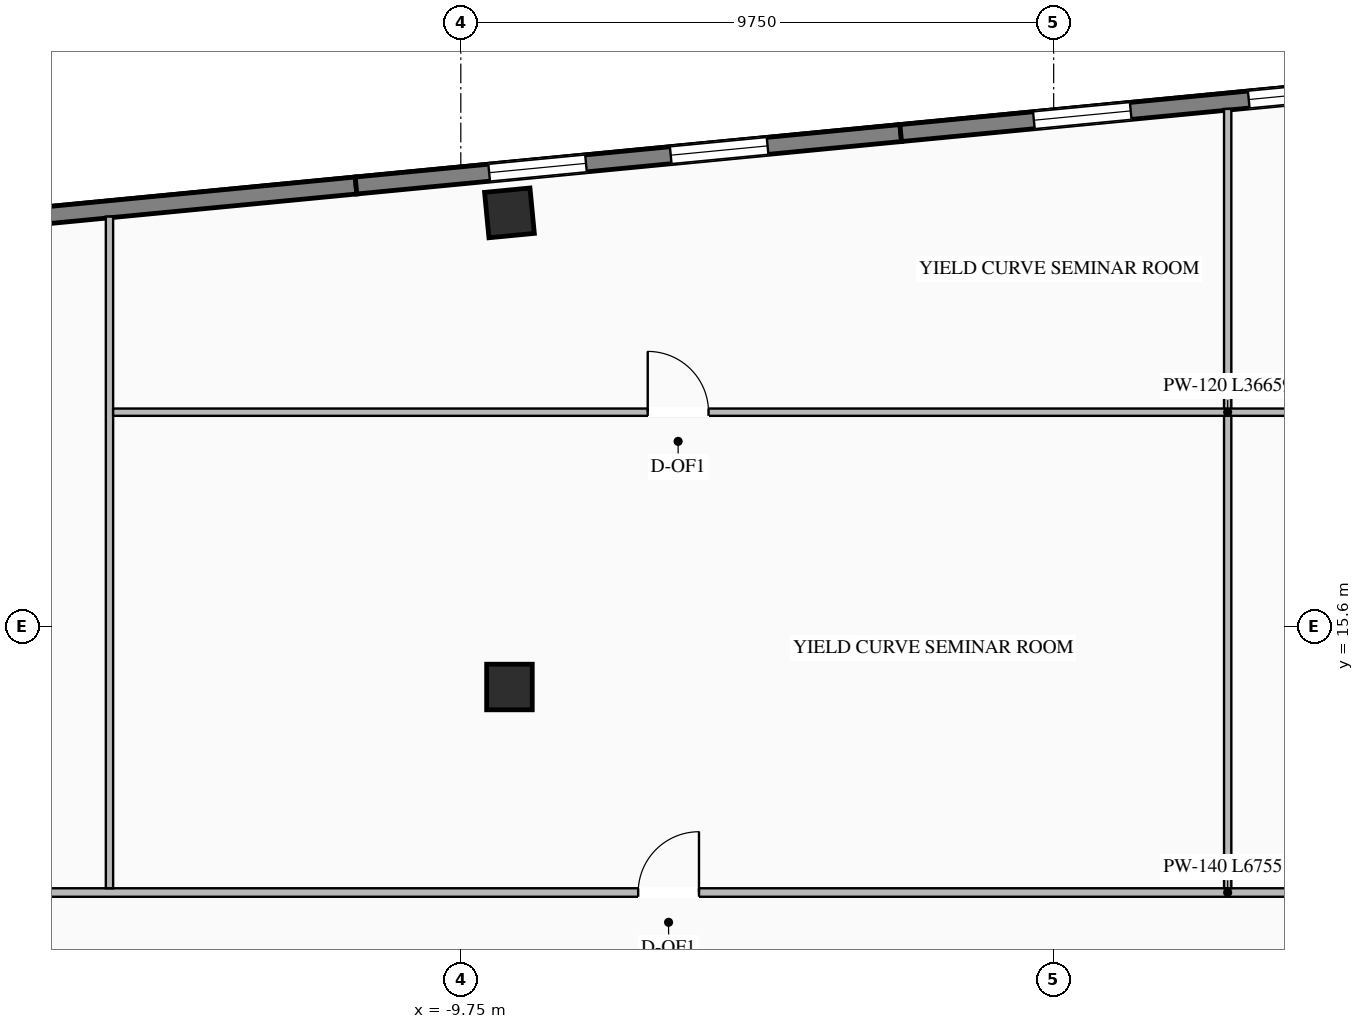
"""IFC4 building model, lengths in metres.
Left out: names, types, materials, properties, quantities, classifications, styles, units other than length and angle.
Written with IfcOpenShell. Run it as: python <this file> out.ifc"""

import sys

from ifc_helpers import new_model, si_unit, direction, frame, frame_2d, origin, origin_2d, place, context, subcontext, project, spatial, rectangle, i_section, extrude, element, fill, save


model = new_model("IFC4")
c1 = context("Model", 3, precision=1e-05, world=origin(), true_north=direction((0.0, 1.0)))
c2 = subcontext(c1, "Body", "Model", "MODEL_VIEW")
j1 = project(units=[si_unit("LENGTHUNIT", "METRE"), si_unit("PLANEANGLEUNIT", "RADIAN")], contexts=[c1])
p1 = place(None, origin())
s1 = spatial("IfcSite", under=j1, at=p1, CompositionType="ELEMENT")
p2 = place(p1, origin())
s2 = spatial("IfcBuilding", under=s1, at=p2, CompositionType="ELEMENT")
p3 = place(p2, frame((0.0, 0.0, 94.9)))
s3 = spatial("IfcBuildingStorey", under=s2, at=p3, CompositionType="ELEMENT", Elevation=94.9)
for number, where, z_axis, x_axis in (
    (1, (-8.95, 14.6, 0.0), (0.0, 0.0, 1.0), (1.0, 0.0, 0.0)),
    (2, (-8.95, 22.398, 0.0), (0.0, 0.0, 1.0), (0.995, 0.096, 0.0)),
):
    element("IfcColumn", number, at=place(p3, frame(where, z_axis=z_axis, x_axis=x_axis)), inside=s3, PredefinedType="COLUMN", context=c2, shape_type="SweptSolid", body=[
        extrude(i_section(OverallWidth=0.75, OverallDepth=0.75, WebThickness=0.03, FlangeThickness=0.044, at=origin_2d()), origin(), (0.0, 0.0, 1.0), 3.45),
    ])
p4 = place(p3, frame((-29.231, 21.138, 0.0), z_axis=(0.0, 0.0, 1.0), x_axis=(0.995395780835, 0.095850088663, 0.0)))
e3 = element("IfcWall", 3, at=p4, inside=s3, PredefinedType="STANDARD", context=c2, shape_type="SweptSolid", body=[
    extrude(rectangle(XDim=17.84, YDim=0.28, at=frame_2d((8.92, 0.0))), origin(), (0.0, 0.0, 1.0), 3.25),
])
p5 = place(p4, frame((5.147, 0.0, 0.76)))
e4 = element("IfcOpeningElement", 4, at=p5, cuts=e3, PredefinedType="OPENING", context=c2, shape_type="SweptSolid", body=[
    extrude(rectangle(XDim=1.6, YDim=1.95, at=frame_2d((0.8, 0.975))), frame((0.0, 0.15, 0.0), z_axis=(0.0, -1.0, 0.0), x_axis=(1.0, 0.0, 0.0)), (0.0, 0.0, 1.0), 0.3),
])
p6 = place(p4, frame((11.093, 0.0, 0.76)))
e5 = element("IfcOpeningElement", 5, at=p6, cuts=e3, PredefinedType="OPENING", context=c2, shape_type="SweptSolid", body=[
    extrude(rectangle(XDim=1.6, YDim=1.95, at=frame_2d((0.8, 0.975))), frame((0.0, 0.15, 0.0), z_axis=(0.0, -1.0, 0.0), x_axis=(1.0, 0.0, 0.0)), (0.0, 0.0, 1.0), 0.3),
])
p7 = place(p3, frame((-11.474, 22.848, 0.0), z_axis=(0.0, 0.0, 1.0), x_axis=(0.995396794462, 0.09583956164, 0.0)))
e6 = element("IfcWall", 6, at=p7, inside=s3, PredefinedType="STANDARD", context=c2, shape_type="SweptSolid", body=[
    extrude(rectangle(XDim=9.0, YDim=0.28, at=frame_2d((4.5, 0.0))), origin(), (0.0, 0.0, 1.0), 3.25),
])
p8 = place(p7, frame((2.2, 0.0, 0.76)))
e7 = element("IfcOpeningElement", 7, at=p8, cuts=e6, PredefinedType="OPENING", context=c2, shape_type="SweptSolid", body=[
    extrude(rectangle(XDim=1.6, YDim=1.95, at=frame_2d((0.8, 0.975))), frame((0.0, 0.15, 0.0), z_axis=(0.0, -1.0, 0.0), x_axis=(1.0, 0.0, 0.0)), (0.0, 0.0, 1.0), 0.3),
])
p9 = place(p7, frame((5.2, 0.0, 0.76)))
e8 = element("IfcOpeningElement", 8, at=p9, cuts=e6, PredefinedType="OPENING", context=c2, shape_type="SweptSolid", body=[
    extrude(rectangle(XDim=1.6, YDim=1.95, at=frame_2d((0.8, 0.975))), frame((0.0, 0.15, 0.0), z_axis=(0.0, -1.0, 0.0), x_axis=(1.0, 0.0, 0.0)), (0.0, 0.0, 1.0), 0.3),
])
p10 = place(p3, frame((-2.515, 23.711, 0.0), z_axis=(0.0, 0.0, 1.0), x_axis=(0.995397043619, 0.095836973841, 0.0)))
e9 = element("IfcWall", 9, at=p10, inside=s3, PredefinedType="STANDARD", context=c2, shape_type="SweptSolid", body=[
    extrude(rectangle(XDim=9.0, YDim=0.28, at=frame_2d((4.5, 0.0))), origin(), (0.0, 0.0, 1.0), 3.25),
])
p11 = place(p10, frame((2.2, 0.0, 0.76)))
e10 = element("IfcOpeningElement", 10, at=p11, cuts=e9, PredefinedType="OPENING", context=c2, shape_type="SweptSolid", body=[
    extrude(rectangle(XDim=1.6, YDim=1.95, at=frame_2d((0.8, 0.975))), frame((0.0, 0.15, 0.0), z_axis=(0.0, -1.0, 0.0), x_axis=(1.0, 0.0, 0.0)), (0.0, 0.0, 1.0), 0.3),
])
p12 = place(p10, frame((5.75, 0.0, 0.76)))
e11 = element("IfcOpeningElement", 11, at=p12, cuts=e9, PredefinedType="OPENING", context=c2, shape_type="SweptSolid", body=[
    extrude(rectangle(XDim=1.6, YDim=1.95, at=frame_2d((0.8, 0.975))), frame((0.0, 0.15, 0.0), z_axis=(0.0, -1.0, 0.0), x_axis=(1.0, 0.0, 0.0)), (0.0, 0.0, 1.0), 0.3),
])
p13 = place(p3, frame((-30.567, 11.22, 0.0), z_axis=(0.0, 0.0, 1.0), x_axis=(1.0, 0.0, 0.0)))
e12 = element("IfcWall", 12, at=p13, inside=s3, PredefinedType="STANDARD", context=c2, shape_type="SweptSolid", body=[
    extrude(rectangle(XDim=67.551, YDim=0.14, at=frame_2d((33.775, 0.0))), origin(), (0.0, 0.0, 1.0), 3.25),
])
p14 = place(p13, frame((7.146, 0.0, 0.0)))
e13 = element("IfcOpeningElement", 13, at=p14, cuts=e12, PredefinedType="OPENING", context=c2, shape_type="SweptSolid", body=[
    extrude(rectangle(XDim=1.0, YDim=2.08, at=frame_2d((0.5, 1.04))), frame((0.0, 0.08, 0.0), z_axis=(0.0, -1.0, 0.0), x_axis=(1.0, 0.0, 0.0)), (0.0, 0.0, 1.0), 0.16),
])
p15 = place(p13, frame((23.734, 0.0, 0.0)))
e14 = element("IfcOpeningElement", 14, at=p15, cuts=e12, PredefinedType="OPENING", context=c2, shape_type="SweptSolid", body=[
    extrude(rectangle(XDim=1.0, YDim=2.08, at=frame_2d((0.5, 1.04))), frame((0.0, 0.08, 0.0), z_axis=(0.0, -1.0, 0.0), x_axis=(1.0, 0.0, 0.0)), (0.0, 0.0, 1.0), 0.16),
])
p16 = place(p13, frame((42.124, 0.0, 0.0)))
e15 = element("IfcOpeningElement", 15, at=p16, cuts=e12, PredefinedType="OPENING", context=c2, shape_type="SweptSolid", body=[
    extrude(rectangle(XDim=1.0, YDim=2.08, at=frame_2d((0.5, 1.04))), frame((0.0, 0.08, 0.0), z_axis=(0.0, -1.0, 0.0), x_axis=(1.0, 0.0, 0.0)), (0.0, 0.0, 1.0), 0.16),
])
p17 = place(p13, frame((59.059, 0.0, 0.0)))
e16 = element("IfcOpeningElement", 16, at=p17, cuts=e12, PredefinedType="OPENING", context=c2, shape_type="SweptSolid", body=[
    extrude(rectangle(XDim=1.0, YDim=2.08, at=frame_2d((0.5, 1.04))), frame((0.0, 0.08, 0.0), z_axis=(0.0, -1.0, 0.0), x_axis=(1.0, 0.0, 0.0)), (0.0, 0.0, 1.0), 0.16),
])
p18 = place(p3, frame((-15.528, 11.29, 0.0), z_axis=(0.0, 0.0, 1.0), x_axis=(0.0, 1.0, 0.0)))
e17 = element("IfcWall", 17, at=p18, inside=s3, PredefinedType="STANDARD", context=c2, shape_type="SweptSolid", body=[
    extrude(rectangle(XDim=11.047, YDim=0.12, at=frame_2d((5.524, 0.0))), origin(), (0.0, 0.0, 1.0), 3.25),
])
p19 = place(p3, frame((2.862, 11.29, 0.0), z_axis=(0.0, 0.0, 1.0), x_axis=(0.0, 1.0, 0.0)))
e18 = element("IfcWall", 18, at=p19, inside=s3, PredefinedType="STANDARD", context=c2, shape_type="SweptSolid", body=[
    extrude(rectangle(XDim=12.818, YDim=0.12, at=frame_2d((6.409, 0.0))), origin(), (0.0, 0.0, 1.0), 3.25),
])
p20 = place(p3, frame((-15.468, 19.12, 0.0), z_axis=(0.0, 0.0, 1.0), x_axis=(1.0, 0.0, 0.0)))
e19 = element("IfcWall", 19, at=p20, inside=s3, PredefinedType="STANDARD", context=c2, shape_type="SweptSolid", body=[
    extrude(rectangle(XDim=36.659, YDim=0.12, at=frame_2d((18.33, 0.0))), origin(), (0.0, 0.0, 1.0), 3.25),
])
p21 = place(p20, frame((8.792, 0.0, 0.0)))
e20 = element("IfcOpeningElement", 20, at=p21, cuts=e19, PredefinedType="OPENING", context=c2, shape_type="SweptSolid", body=[
    extrude(rectangle(XDim=1.0, YDim=2.08, at=frame_2d((0.5, 1.04))), frame((0.0, 0.07, 0.0), z_axis=(0.0, -1.0, 0.0), x_axis=(1.0, 0.0, 0.0)), (0.0, 0.0, 1.0), 0.14),
])
p22 = place(p20, frame((26.867, 0.0, 0.0)))
e21 = element("IfcOpeningElement", 21, at=p22, cuts=e19, PredefinedType="OPENING", context=c2, shape_type="SweptSolid", body=[
    extrude(rectangle(XDim=1.0, YDim=2.08, at=frame_2d((0.5, 1.04))), frame((0.0, 0.07, 0.0), z_axis=(0.0, -1.0, 0.0), x_axis=(1.0, 0.0, 0.0)), (0.0, 0.0, 1.0), 0.14),
])
p23 = place(p8, origin())
e22 = element("IfcWindow", 22, at=p23, inside=s3, PartitioningType="SINGLE_PANEL", PredefinedType="WINDOW", context=c2, shape_type="SweptSolid", body=[
    extrude(rectangle(XDim=1.6, YDim=1.95, at=frame_2d((0.8, 0.975))), frame((0.0, 0.03, 0.0), z_axis=(0.0, -1.0, 0.0), x_axis=(1.0, 0.0, 0.0)), (0.0, 0.0, 1.0), 0.06),
])
fill(e7, e22)
p24 = place(p9, origin())
e23 = element("IfcWindow", 23, at=p24, inside=s3, PartitioningType="SINGLE_PANEL", PredefinedType="WINDOW", context=c2, shape_type="SweptSolid", body=[
    extrude(rectangle(XDim=1.6, YDim=1.95, at=frame_2d((0.8, 0.975))), frame((0.0, 0.03, 0.0), z_axis=(0.0, -1.0, 0.0), x_axis=(1.0, 0.0, 0.0)), (0.0, 0.0, 1.0), 0.06),
])
fill(e8, e23)
p25 = place(p11, origin())
e24 = element("IfcWindow", 24, at=p25, inside=s3, PartitioningType="SINGLE_PANEL", PredefinedType="WINDOW", context=c2, shape_type="SweptSolid", body=[
    extrude(rectangle(XDim=1.6, YDim=1.95, at=frame_2d((0.8, 0.975))), frame((0.0, 0.03, 0.0), z_axis=(0.0, -1.0, 0.0), x_axis=(1.0, 0.0, 0.0)), (0.0, 0.0, 1.0), 0.06),
])
fill(e10, e24)
p26 = place(p12, origin())
e25 = element("IfcWindow", 25, at=p26, inside=s3, PartitioningType="SINGLE_PANEL", PredefinedType="WINDOW", context=c2, shape_type="SweptSolid", body=[
    extrude(rectangle(XDim=1.6, YDim=1.95, at=frame_2d((0.8, 0.975))), frame((0.0, 0.03, 0.0), z_axis=(0.0, -1.0, 0.0), x_axis=(1.0, 0.0, 0.0)), (0.0, 0.0, 1.0), 0.06),
])
fill(e11, e25)
p27 = place(p15, origin())
e26 = element("IfcDoor", 26, at=p27, inside=s3, OperationType="SINGLE_SWING_RIGHT", PredefinedType="DOOR", context=c2, shape_type="SweptSolid", body=[
    extrude(rectangle(XDim=1.0, YDim=2.08, at=frame_2d((0.5, 1.04))), frame((0.0, 0.025, 0.0), z_axis=(0.0, -1.0, 0.0), x_axis=(1.0, 0.0, 0.0)), (0.0, 0.0, 1.0), 0.05),
])
fill(e14, e26)
p28 = place(p21, origin())
e27 = element("IfcDoor", 27, at=p28, inside=s3, OperationType="SINGLE_SWING_LEFT", PredefinedType="DOOR", context=c2, shape_type="SweptSolid", body=[
    extrude(rectangle(XDim=1.0, YDim=2.08, at=frame_2d((0.5, 1.04))), frame((0.0, 0.025, 0.0), z_axis=(0.0, -1.0, 0.0), x_axis=(1.0, 0.0, 0.0)), (0.0, 0.0, 1.0), 0.05),
])
fill(e20, e27)
save(model, sys.argv[1])
